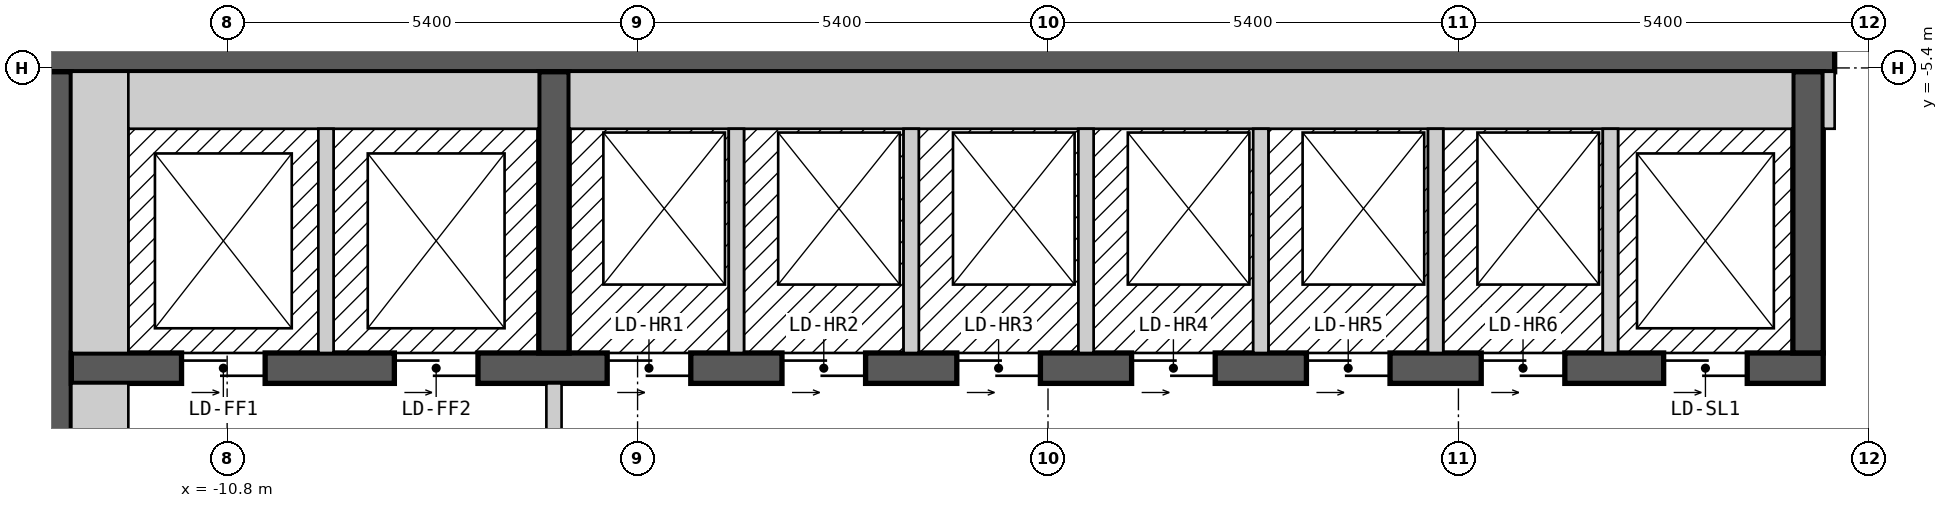
"""IFC4 building model, lengths in metres.
Left out: names, types, materials, properties, quantities, classifications, styles, units other than length and angle.
Written with IfcOpenShell. Run it as: python <this file> out.ifc"""

import sys

from ifc_helpers import new_model, si_unit, direction, frame, frame_2d, origin, place, context, subcontext, project, spatial, rectangle, extrude, element, fill, save


model = new_model("IFC4")
c1 = context("Model", 3, precision=1e-05, world=origin(), true_north=direction((0.0, 1.0)))
c2 = subcontext(c1, "Body", "Model", "MODEL_VIEW")
j1 = project(units=[si_unit("LENGTHUNIT", "METRE"), si_unit("PLANEANGLEUNIT", "RADIAN")], contexts=[c1])
p1 = place(None, origin())
s1 = spatial("IfcSite", under=j1, at=p1, CompositionType="ELEMENT")
p2 = place(p1, origin())
s2 = spatial("IfcBuilding", under=s1, at=p2, CompositionType="ELEMENT")
p3 = place(p2, frame((0.0, 0.0, 205.8)))
s3 = spatial("IfcBuildingStorey", under=s2, at=p3, CompositionType="ELEMENT", Elevation=205.8)
p4 = place(p3, frame((-13.3, -5.225, 0.0), z_axis=(0.0, 0.0, 1.0), x_axis=(1.0, 0.0, 0.0)))
e1 = element("IfcWall", 1, at=p4, inside=s3, PredefinedType="SHEAR", context=c2, shape_type="SweptSolid", body=[
    extrude(rectangle(XDim=26.6, YDim=0.45, at=frame_2d((13.3, 0.0))), origin(), (0.0, 0.0, 1.0), 2.7),
])
p5 = place(p4, frame((23.65, 0.0, 0.0)))
e2 = element("IfcOpeningElement", 2, at=p5, cuts=e1, PredefinedType="OPENING", context=c2, shape_type="SweptSolid", body=[
    extrude(rectangle(XDim=1.2, YDim=2.1, at=frame_2d((0.6, 1.05))), frame((0.0, 0.235, 0.0), z_axis=(0.0, -1.0, 0.0), x_axis=(1.0, 0.0, 0.0)), (0.0, 0.0, 1.0), 0.47),
])
p6 = place(p3, frame((-13.075, -18.55, 0.0), z_axis=(0.0, 0.0, 1.0), x_axis=(0.0, 1.0, 0.0)))
e3 = element("IfcWall", 3, at=p6, inside=s3, PredefinedType="SHEAR", context=c2, shape_type="SweptSolid", body=[
    extrude(rectangle(XDim=13.1, YDim=0.45, at=frame_2d((6.55, 0.0))), origin(), (0.0, 0.0, 1.0), 2.7),
])
p7 = place(p6, frame((4.35, 0.0, 0.0)))
e4 = element("IfcOpeningElement", 4, at=p7, cuts=e3, PredefinedType="OPENING", context=c2, shape_type="SweptSolid", body=[
    extrude(rectangle(XDim=1.2, YDim=2.1, at=frame_2d((0.6, 1.05))), frame((0.0, 0.235, 0.0), z_axis=(0.0, -1.0, 0.0), x_axis=(1.0, 0.0, 0.0)), (0.0, 0.0, 1.0), 0.47),
])
p8 = place(p3, frame((-12.85, -9.35, 0.0), z_axis=(0.0, 0.0, 1.0), x_axis=(1.0, 0.0, 0.0)))
e5 = element("IfcWall", 5, at=p8, inside=s3, PredefinedType="SHEAR", context=c2, shape_type="SweptSolid", body=[
    extrude(rectangle(XDim=23.05, YDim=0.4, at=frame_2d((11.525, 0.0))), origin(), (0.0, 0.0, 1.0), 2.7),
])
p9 = place(p8, frame((1.45, 0.0, 0.0)))
e6 = element("IfcOpeningElement", 6, at=p9, cuts=e5, PredefinedType="OPENING", context=c2, shape_type="SweptSolid", body=[
    extrude(rectangle(XDim=1.1, YDim=2.1, at=frame_2d((0.55, 1.05))), frame((0.0, 0.21, 0.0), z_axis=(0.0, -1.0, 0.0), x_axis=(1.0, 0.0, 0.0)), (0.0, 0.0, 1.0), 0.42),
])
p10 = place(p8, frame((4.25, 0.0, 0.0)))
e7 = element("IfcOpeningElement", 7, at=p10, cuts=e5, PredefinedType="OPENING", context=c2, shape_type="SweptSolid", body=[
    extrude(rectangle(XDim=1.1, YDim=2.1, at=frame_2d((0.55, 1.05))), frame((0.0, 0.21, 0.0), z_axis=(0.0, -1.0, 0.0), x_axis=(1.0, 0.0, 0.0)), (0.0, 0.0, 1.0), 0.42),
])
p11 = place(p8, frame((7.05, 0.0, 0.0)))
e8 = element("IfcOpeningElement", 8, at=p11, cuts=e5, PredefinedType="OPENING", context=c2, shape_type="SweptSolid", body=[
    extrude(rectangle(XDim=1.1, YDim=2.1, at=frame_2d((0.55, 1.05))), frame((0.0, 0.21, 0.0), z_axis=(0.0, -1.0, 0.0), x_axis=(1.0, 0.0, 0.0)), (0.0, 0.0, 1.0), 0.42),
])
p12 = place(p8, frame((9.35, 0.0, 0.0)))
e9 = element("IfcOpeningElement", 9, at=p12, cuts=e5, PredefinedType="OPENING", context=c2, shape_type="SweptSolid", body=[
    extrude(rectangle(XDim=1.1, YDim=2.1, at=frame_2d((0.55, 1.05))), frame((0.0, 0.21, 0.0), z_axis=(0.0, -1.0, 0.0), x_axis=(1.0, 0.0, 0.0)), (0.0, 0.0, 1.0), 0.42),
])
p13 = place(p8, frame((11.65, 0.0, 0.0)))
e10 = element("IfcOpeningElement", 10, at=p13, cuts=e5, PredefinedType="OPENING", context=c2, shape_type="SweptSolid", body=[
    extrude(rectangle(XDim=1.1, YDim=2.1, at=frame_2d((0.55, 1.05))), frame((0.0, 0.21, 0.0), z_axis=(0.0, -1.0, 0.0), x_axis=(1.0, 0.0, 0.0)), (0.0, 0.0, 1.0), 0.42),
])
p14 = place(p8, frame((13.95, 0.0, 0.0)))
e11 = element("IfcOpeningElement", 11, at=p14, cuts=e5, PredefinedType="OPENING", context=c2, shape_type="SweptSolid", body=[
    extrude(rectangle(XDim=1.1, YDim=2.1, at=frame_2d((0.55, 1.05))), frame((0.0, 0.21, 0.0), z_axis=(0.0, -1.0, 0.0), x_axis=(1.0, 0.0, 0.0)), (0.0, 0.0, 1.0), 0.42),
])
p15 = place(p8, frame((16.25, 0.0, 0.0)))
e12 = element("IfcOpeningElement", 12, at=p15, cuts=e5, PredefinedType="OPENING", context=c2, shape_type="SweptSolid", body=[
    extrude(rectangle(XDim=1.1, YDim=2.1, at=frame_2d((0.55, 1.05))), frame((0.0, 0.21, 0.0), z_axis=(0.0, -1.0, 0.0), x_axis=(1.0, 0.0, 0.0)), (0.0, 0.0, 1.0), 0.42),
])
p16 = place(p8, frame((18.55, 0.0, 0.0)))
e13 = element("IfcOpeningElement", 13, at=p16, cuts=e5, PredefinedType="OPENING", context=c2, shape_type="SweptSolid", body=[
    extrude(rectangle(XDim=1.1, YDim=2.1, at=frame_2d((0.55, 1.05))), frame((0.0, 0.21, 0.0), z_axis=(0.0, -1.0, 0.0), x_axis=(1.0, 0.0, 0.0)), (0.0, 0.0, 1.0), 0.42),
])
p17 = place(p8, frame((20.95, 0.0, 0.0)))
e14 = element("IfcOpeningElement", 14, at=p17, cuts=e5, PredefinedType="OPENING", context=c2, shape_type="SweptSolid", body=[
    extrude(rectangle(XDim=1.1, YDim=2.1, at=frame_2d((0.55, 1.05))), frame((0.0, 0.21, 0.0), z_axis=(0.0, -1.0, 0.0), x_axis=(1.0, 0.0, 0.0)), (0.0, 0.0, 1.0), 0.42),
])
for number, where, z_axis, x_axis in (
    (15, (-6.5, -9.15, 0.0), (0.0, 0.0, 1.0), (0.0, 1.0, 0.0)),
    (16, (10.0, -9.15, 0.0), (0.0, 0.0, 1.0), (0.0, 1.0, 0.0)),
):
    element("IfcWall", number, at=place(p3, frame(where, z_axis=z_axis, x_axis=x_axis)), inside=s3, PredefinedType="SHEAR", context=c2, shape_type="SweptSolid", body=[
        extrude(rectangle(XDim=3.7, YDim=0.4, at=frame_2d((1.85, 0.0))), origin(), (0.0, 0.0, 1.0), 2.7),
    ])
p18 = place(p3, frame((-12.475, -13.0, 0.0), z_axis=(0.0, 0.0, 1.0), x_axis=(0.0, 1.0, 0.0)))
e17 = element("IfcWall", 17, at=p18, inside=s3, PredefinedType="PARTITIONING", context=c2, shape_type="SweptSolid", body=[
    extrude(rectangle(XDim=3.45, YDim=0.75, at=frame_2d((1.725, 0.0))), origin(), (0.0, 0.0, 1.0), 2.7),
])
p19 = place(p3, frame((-12.475, -9.15, 0.0), z_axis=(0.0, 0.0, 1.0), x_axis=(0.0, 1.0, 0.0)))
e18 = element("IfcWall", 18, at=p19, inside=s3, PredefinedType="SOLIDWALL", context=c2, shape_type="SweptSolid", body=[
    extrude(rectangle(XDim=3.7, YDim=0.75, at=frame_2d((1.85, 0.0))), origin(), (0.0, 0.0, 1.0), 2.7),
])
p20 = place(p3, frame((-12.1, -5.825, 0.0), z_axis=(0.0, 0.0, 1.0), x_axis=(1.0, 0.0, 0.0)))
e19 = element("IfcWall", 19, at=p20, inside=s3, PredefinedType="SOLIDWALL", context=c2, shape_type="SweptSolid", body=[
    extrude(rectangle(XDim=5.4, YDim=0.75, at=frame_2d((2.7, 0.0))), origin(), (0.0, 0.0, 1.0), 2.7),
])
p21 = place(p3, frame((-9.5, -9.15, 0.0), z_axis=(0.0, 0.0, 1.0), x_axis=(0.0, 1.0, 0.0)))
e20 = element("IfcWall", 20, at=p21, inside=s3, PredefinedType="SOLIDWALL", context=c2, shape_type="SweptSolid", body=[
    extrude(rectangle(XDim=2.95, YDim=0.2, at=frame_2d((1.475, 0.0))), origin(), (0.0, 0.0, 1.0), 2.7),
])
p22 = place(p3, frame((-6.5, -14.45, 0.0), z_axis=(0.0, 0.0, 1.0), x_axis=(0.0, 1.0, 0.0)))
e21 = element("IfcWall", 21, at=p22, inside=s3, PredefinedType="PARTITIONING", context=c2, shape_type="SweptSolid", body=[
    extrude(rectangle(XDim=4.9, YDim=0.2, at=frame_2d((2.45, 0.0))), origin(), (0.0, 0.0, 1.0), 2.7),
])
p23 = place(p22, frame((3.15, 0.0, 0.0), z_axis=(0.0, 0.0, 1.0), x_axis=(-1.0, 0.0, 0.0)))
e22 = element("IfcOpeningElement", 22, at=p23, cuts=e21, PredefinedType="OPENING", context=c2, shape_type="SweptSolid", body=[
    extrude(rectangle(XDim=1.4, YDim=2.1, at=frame_2d((0.7, 1.05))), frame((0.0, 0.11, 0.0), z_axis=(0.0, -1.0, 0.0), x_axis=(1.0, 0.0, 0.0)), (0.0, 0.0, 1.0), 0.22),
])
p24 = place(p3, frame((-6.3, -5.825, 0.0), z_axis=(0.0, 0.0, 1.0), x_axis=(1.0, 0.0, 0.0)))
e23 = element("IfcWall", 23, at=p24, inside=s3, PredefinedType="SOLIDWALL", context=c2, shape_type="SweptSolid", body=[
    extrude(rectangle(XDim=16.1, YDim=0.75, at=frame_2d((8.05, 0.0))), origin(), (0.0, 0.0, 1.0), 2.7),
])
for number, where, z_axis, x_axis in (
    (24, (-4.1, -9.15, 0.0), (0.0, 0.0, 1.0), (0.0, 1.0, 0.0)),
    (25, (-1.8, -9.15, 0.0), (0.0, 0.0, 1.0), (0.0, 1.0, 0.0)),
    (26, (0.5, -9.15, 0.0), (0.0, 0.0, 1.0), (0.0, 1.0, 0.0)),
    (27, (2.8, -9.15, 0.0), (0.0, 0.0, 1.0), (0.0, 1.0, 0.0)),
    (28, (5.1, -9.15, 0.0), (0.0, 0.0, 1.0), (0.0, 1.0, 0.0)),
    (29, (7.4, -9.15, 0.0), (0.0, 0.0, 1.0), (0.0, 1.0, 0.0)),
):
    element("IfcWall", number, at=place(p3, frame(where, z_axis=z_axis, x_axis=x_axis)), inside=s3, PredefinedType="SOLIDWALL", context=c2, shape_type="SweptSolid", body=[
        extrude(rectangle(XDim=2.95, YDim=0.2, at=frame_2d((1.475, 0.0))), origin(), (0.0, 0.0, 1.0), 2.7),
    ])
p25 = place(p3, frame((10.275, -6.2, 0.0), z_axis=(0.0, 0.0, 1.0), x_axis=(0.0, 1.0, 0.0)))
e30 = element("IfcWall", 30, at=p25, inside=s3, PredefinedType="PARTITIONING", context=c2, shape_type="SweptSolid", body=[
    extrude(rectangle(XDim=0.75, YDim=0.15, at=frame_2d((0.375, 0.0))), origin(), (0.0, 0.0, 1.0), 2.7),
])
p26 = place(p9, origin())
e31 = element("IfcDoor", 31, at=p26, inside=s3, OperationType="DOUBLE_DOOR_SLIDING", PredefinedType="DOOR", context=c2, shape_type="SweptSolid", body=[
    extrude(rectangle(XDim=1.1, YDim=2.1, at=frame_2d((0.55, 1.05))), frame((0.0, 0.025, 0.0), z_axis=(0.0, -1.0, 0.0), x_axis=(1.0, 0.0, 0.0)), (0.0, 0.0, 1.0), 0.05),
])
fill(e6, e31)
p27 = place(p10, origin())
e32 = element("IfcDoor", 32, at=p27, inside=s3, OperationType="DOUBLE_DOOR_SLIDING", PredefinedType="DOOR", context=c2, shape_type="SweptSolid", body=[
    extrude(rectangle(XDim=1.1, YDim=2.1, at=frame_2d((0.55, 1.05))), frame((0.0, 0.025, 0.0), z_axis=(0.0, -1.0, 0.0), x_axis=(1.0, 0.0, 0.0)), (0.0, 0.0, 1.0), 0.05),
])
fill(e7, e32)
p28 = place(p11, origin())
e33 = element("IfcDoor", 33, at=p28, inside=s3, OperationType="DOUBLE_DOOR_SLIDING", PredefinedType="DOOR", context=c2, shape_type="SweptSolid", body=[
    extrude(rectangle(XDim=1.1, YDim=2.1, at=frame_2d((0.55, 1.05))), frame((0.0, 0.025, 0.0), z_axis=(0.0, -1.0, 0.0), x_axis=(1.0, 0.0, 0.0)), (0.0, 0.0, 1.0), 0.05),
])
fill(e8, e33)
p29 = place(p12, origin())
e34 = element("IfcDoor", 34, at=p29, inside=s3, OperationType="DOUBLE_DOOR_SLIDING", PredefinedType="DOOR", context=c2, shape_type="SweptSolid", body=[
    extrude(rectangle(XDim=1.1, YDim=2.1, at=frame_2d((0.55, 1.05))), frame((0.0, 0.025, 0.0), z_axis=(0.0, -1.0, 0.0), x_axis=(1.0, 0.0, 0.0)), (0.0, 0.0, 1.0), 0.05),
])
fill(e9, e34)
p30 = place(p13, origin())
e35 = element("IfcDoor", 35, at=p30, inside=s3, OperationType="DOUBLE_DOOR_SLIDING", PredefinedType="DOOR", context=c2, shape_type="SweptSolid", body=[
    extrude(rectangle(XDim=1.1, YDim=2.1, at=frame_2d((0.55, 1.05))), frame((0.0, 0.025, 0.0), z_axis=(0.0, -1.0, 0.0), x_axis=(1.0, 0.0, 0.0)), (0.0, 0.0, 1.0), 0.05),
])
fill(e10, e35)
p31 = place(p14, origin())
e36 = element("IfcDoor", 36, at=p31, inside=s3, OperationType="DOUBLE_DOOR_SLIDING", PredefinedType="DOOR", context=c2, shape_type="SweptSolid", body=[
    extrude(rectangle(XDim=1.1, YDim=2.1, at=frame_2d((0.55, 1.05))), frame((0.0, 0.025, 0.0), z_axis=(0.0, -1.0, 0.0), x_axis=(1.0, 0.0, 0.0)), (0.0, 0.0, 1.0), 0.05),
])
fill(e11, e36)
p32 = place(p15, origin())
e37 = element("IfcDoor", 37, at=p32, inside=s3, OperationType="DOUBLE_DOOR_SLIDING", PredefinedType="DOOR", context=c2, shape_type="SweptSolid", body=[
    extrude(rectangle(XDim=1.1, YDim=2.1, at=frame_2d((0.55, 1.05))), frame((0.0, 0.025, 0.0), z_axis=(0.0, -1.0, 0.0), x_axis=(1.0, 0.0, 0.0)), (0.0, 0.0, 1.0), 0.05),
])
fill(e12, e37)
p33 = place(p16, origin())
e38 = element("IfcDoor", 38, at=p33, inside=s3, OperationType="DOUBLE_DOOR_SLIDING", PredefinedType="DOOR", context=c2, shape_type="SweptSolid", body=[
    extrude(rectangle(XDim=1.1, YDim=2.1, at=frame_2d((0.55, 1.05))), frame((0.0, 0.025, 0.0), z_axis=(0.0, -1.0, 0.0), x_axis=(1.0, 0.0, 0.0)), (0.0, 0.0, 1.0), 0.05),
])
fill(e13, e38)
p34 = place(p17, origin())
e39 = element("IfcDoor", 39, at=p34, inside=s3, OperationType="DOUBLE_DOOR_SLIDING", PredefinedType="DOOR", context=c2, shape_type="SweptSolid", body=[
    extrude(rectangle(XDim=1.1, YDim=2.1, at=frame_2d((0.55, 1.05))), frame((0.0, 0.025, 0.0), z_axis=(0.0, -1.0, 0.0), x_axis=(1.0, 0.0, 0.0)), (0.0, 0.0, 1.0), 0.05),
])
fill(e14, e39)
p35 = place(p5, origin())
e40 = element("IfcDoor", 40, at=p35, inside=s3, OperationType="DOUBLE_DOOR_SINGLE_SWING", PredefinedType="DOOR", context=c2, shape_type="SweptSolid", body=[
    extrude(rectangle(XDim=1.2, YDim=2.1, at=frame_2d((0.6, 1.05))), frame((0.0, 0.025, 0.0), z_axis=(0.0, -1.0, 0.0), x_axis=(1.0, 0.0, 0.0)), (0.0, 0.0, 1.0), 0.05),
])
fill(e2, e40)
save(model, sys.argv[1])
